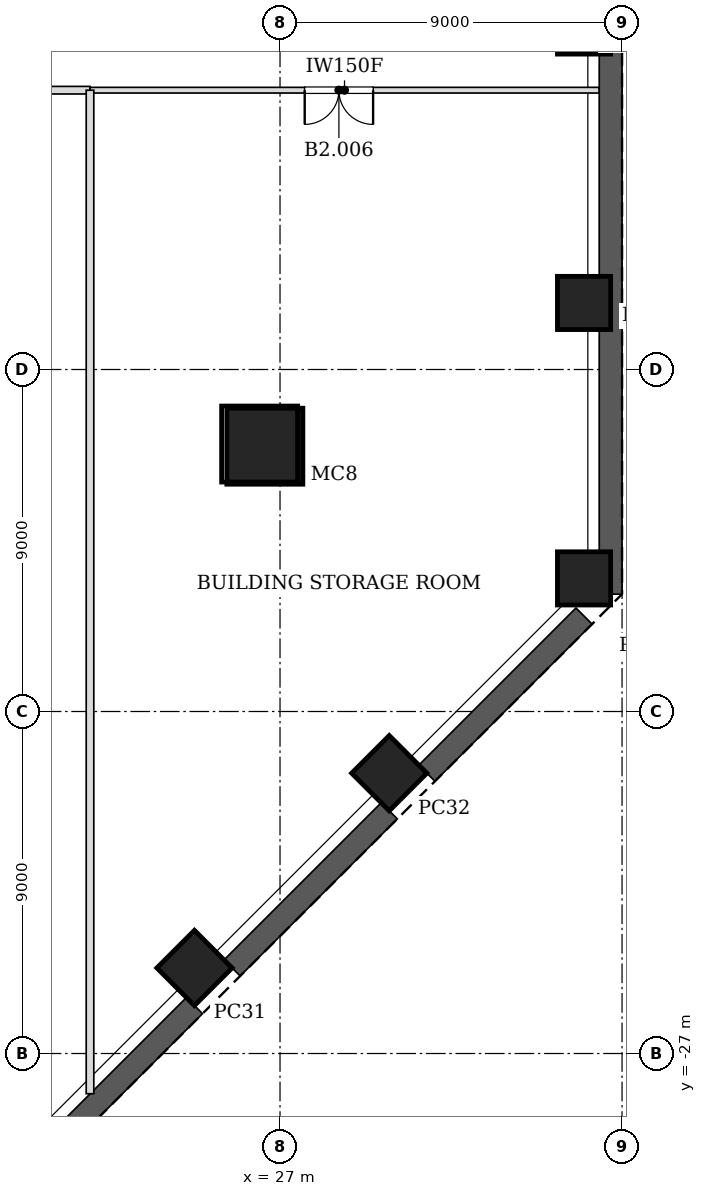
"""IFC4 building model, lengths in metres.
Left out: names, types, materials, properties, quantities, classifications, styles, units other than length and angle.
Written with IfcOpenShell. Run it as: python <this file> out.ifc"""

import sys

from ifc_helpers import new_model, si_unit, direction, frame, frame_2d, origin, origin_2d, place, context, subcontext, project, spatial, rectangle, hollow_rectangle, extrude, element, fill, save


model = new_model("IFC4")
c1 = context("Model", 3, precision=1e-05, world=origin(), true_north=direction((0.0, 1.0)))
c2 = subcontext(c1, "Body", "Model", "MODEL_VIEW")
j1 = project(units=[si_unit("LENGTHUNIT", "METRE"), si_unit("PLANEANGLEUNIT", "RADIAN")], contexts=[c1])
p1 = place(None, origin())
s1 = spatial("IfcSite", under=j1, at=p1, CompositionType="ELEMENT")
p2 = place(p1, origin())
s2 = spatial("IfcBuilding", under=s1, at=p2, CompositionType="ELEMENT")
p3 = place(p2, frame((0.0, 0.0, -9.0)))
s3 = spatial("IfcBuildingStorey", under=s2, at=p3, CompositionType="ELEMENT", Elevation=-9.0)
p4 = place(p3, frame((26.601, -11.019, -0.35), z_axis=(-0.02827628346, 0.011723085491, 0.999531400737), x_axis=(-0.382980813568, -0.923756297104, 0.0)))
e1 = element("IfcColumn", 1, at=p4, inside=s3, PredefinedType="COLUMN", context=c2, shape_type="SweptSolid", body=[
    extrude(hollow_rectangle(XDim=2.0, YDim=2.0, WallThickness=0.09, at=origin_2d()), origin(), (0.0, 0.0, 1.0), 4.852),
])
for number, where, z_axis, x_axis in (
    (2, (35.0, -14.498, -0.35), (0.0, 0.0, 1.0), (1.0, 0.0, 0.0)),
    (3, (35.0, -7.249, -0.35), (0.0, 0.0, 1.0), (1.0, 0.0, 0.0)),
    (4, (35.0, 0.0, -0.35), (0.0, 0.0, 1.0), (1.0, 0.0, 0.0)),
    (5, (24.749, -24.749, -0.35), (0.0, 0.0, 1.0), (0.707, 0.707, 0.0)),
    (6, (29.874, -19.623, -0.35), (0.0, 0.0, 1.0), (0.707, 0.707, 0.0)),
):
    element("IfcColumn", number, at=place(p3, frame(where, z_axis=z_axis, x_axis=x_axis)), inside=s3, PredefinedType="COLUMN", context=c2, shape_type="SweptSolid", body=[
        extrude(rectangle(XDim=1.4, YDim=1.4, at=origin_2d()), origin(), (0.0, 0.0, 1.0), 4.85),
    ])
p5 = place(p3, frame((35.7, -14.912, 0.0), z_axis=(0.0, 0.0, 1.0), x_axis=(0.0, 1.0, 0.0)))
e7 = element("IfcWall", 7, at=p5, inside=s3, PredefinedType="SOLIDWALL", context=c2, shape_type="SweptSolid", body=[
    extrude(rectangle(XDim=29.823, YDim=0.6, at=frame_2d((14.912, 0.0))), origin(), (0.0, 0.0, 1.0), 4.2),
])
p6 = place(p3, frame((14.699, -35.788, 0.0), z_axis=(0.0, 0.0, 1.0), x_axis=(0.707106781187, 0.707106781187, 0.0)))
e8 = element("IfcWall", 8, at=p6, inside=s3, PredefinedType="SOLIDWALL", context=c2, shape_type="SweptSolid", body=[
    extrude(rectangle(XDim=29.823, YDim=0.6, at=frame_2d((14.912, 0.0))), origin(), (0.0, 0.0, 1.0), 4.2),
])
p7 = place(p3, frame((14.5, -1.65, 0.0), z_axis=(0.0, 0.0, 1.0), x_axis=(1.0, 0.0, 0.0)))
e9 = element("IfcWall", 9, at=p7, inside=s3, PredefinedType="PARTITIONING", context=c2, shape_type="SweptSolid", body=[
    extrude(rectangle(XDim=7.501, YDim=0.2, at=frame_2d((3.75, 0.0))), origin(), (0.0, 0.0, 1.0), 3.278),
])
p8 = place(p3, frame((21.999, -1.65, 0.0), z_axis=(0.0, 0.0, 1.0), x_axis=(1.0, 0.0, 0.0)))
e10 = element("IfcWall", 10, at=p8, inside=s3, PredefinedType="PARTITIONING", context=c2, shape_type="SweptSolid", body=[
    extrude(rectangle(XDim=13.396, YDim=0.15, at=frame_2d((6.698, 0.0))), origin(), (0.0, 0.0, 1.0), 3.179),
])
p9 = place(p8, frame((5.65, 0.0, 0.0)))
e11 = element("IfcOpeningElement", 11, at=p9, cuts=e10, PredefinedType="OPENING", context=c2, shape_type="SweptSolid", body=[
    extrude(rectangle(XDim=1.8, YDim=2.4, at=frame_2d((0.9, 1.2))), frame((0.0, 0.085, 0.0), z_axis=(0.0, -1.0, 0.0), x_axis=(1.0, 0.0, 0.0)), (0.0, 0.0, 1.0), 0.17),
])
p10 = place(p3, frame((22.0, -28.058, 0.0), z_axis=(0.0, 0.0, 1.0), x_axis=(0.0, 1.0, 0.0)))
e12 = element("IfcWall", 12, at=p10, inside=s3, PredefinedType="PARTITIONING", context=c2, shape_type="SweptSolid", body=[
    extrude(rectangle(XDim=26.408, YDim=0.2, at=frame_2d((13.204, 0.0))), origin(), (0.0, 0.0, 1.0), 2.89),
])
p11 = place(p9, frame((1.8, 0.0, 0.0), z_axis=(0.0, 0.0, 1.0), x_axis=(-1.0, 0.0, 0.0)))
e13 = element("IfcDoor", 13, at=p11, inside=s3, OperationType="DOUBLE_DOOR_SINGLE_SWING", PredefinedType="DOOR", context=c2, shape_type="SweptSolid", body=[
    extrude(rectangle(XDim=1.8, YDim=2.4, at=frame_2d((0.9, 1.2))), frame((0.0, 0.025, 0.0), z_axis=(0.0, -1.0, 0.0), x_axis=(1.0, 0.0, 0.0)), (0.0, 0.0, 1.0), 0.05),
])
fill(e11, e13)
save(model, sys.argv[1])
